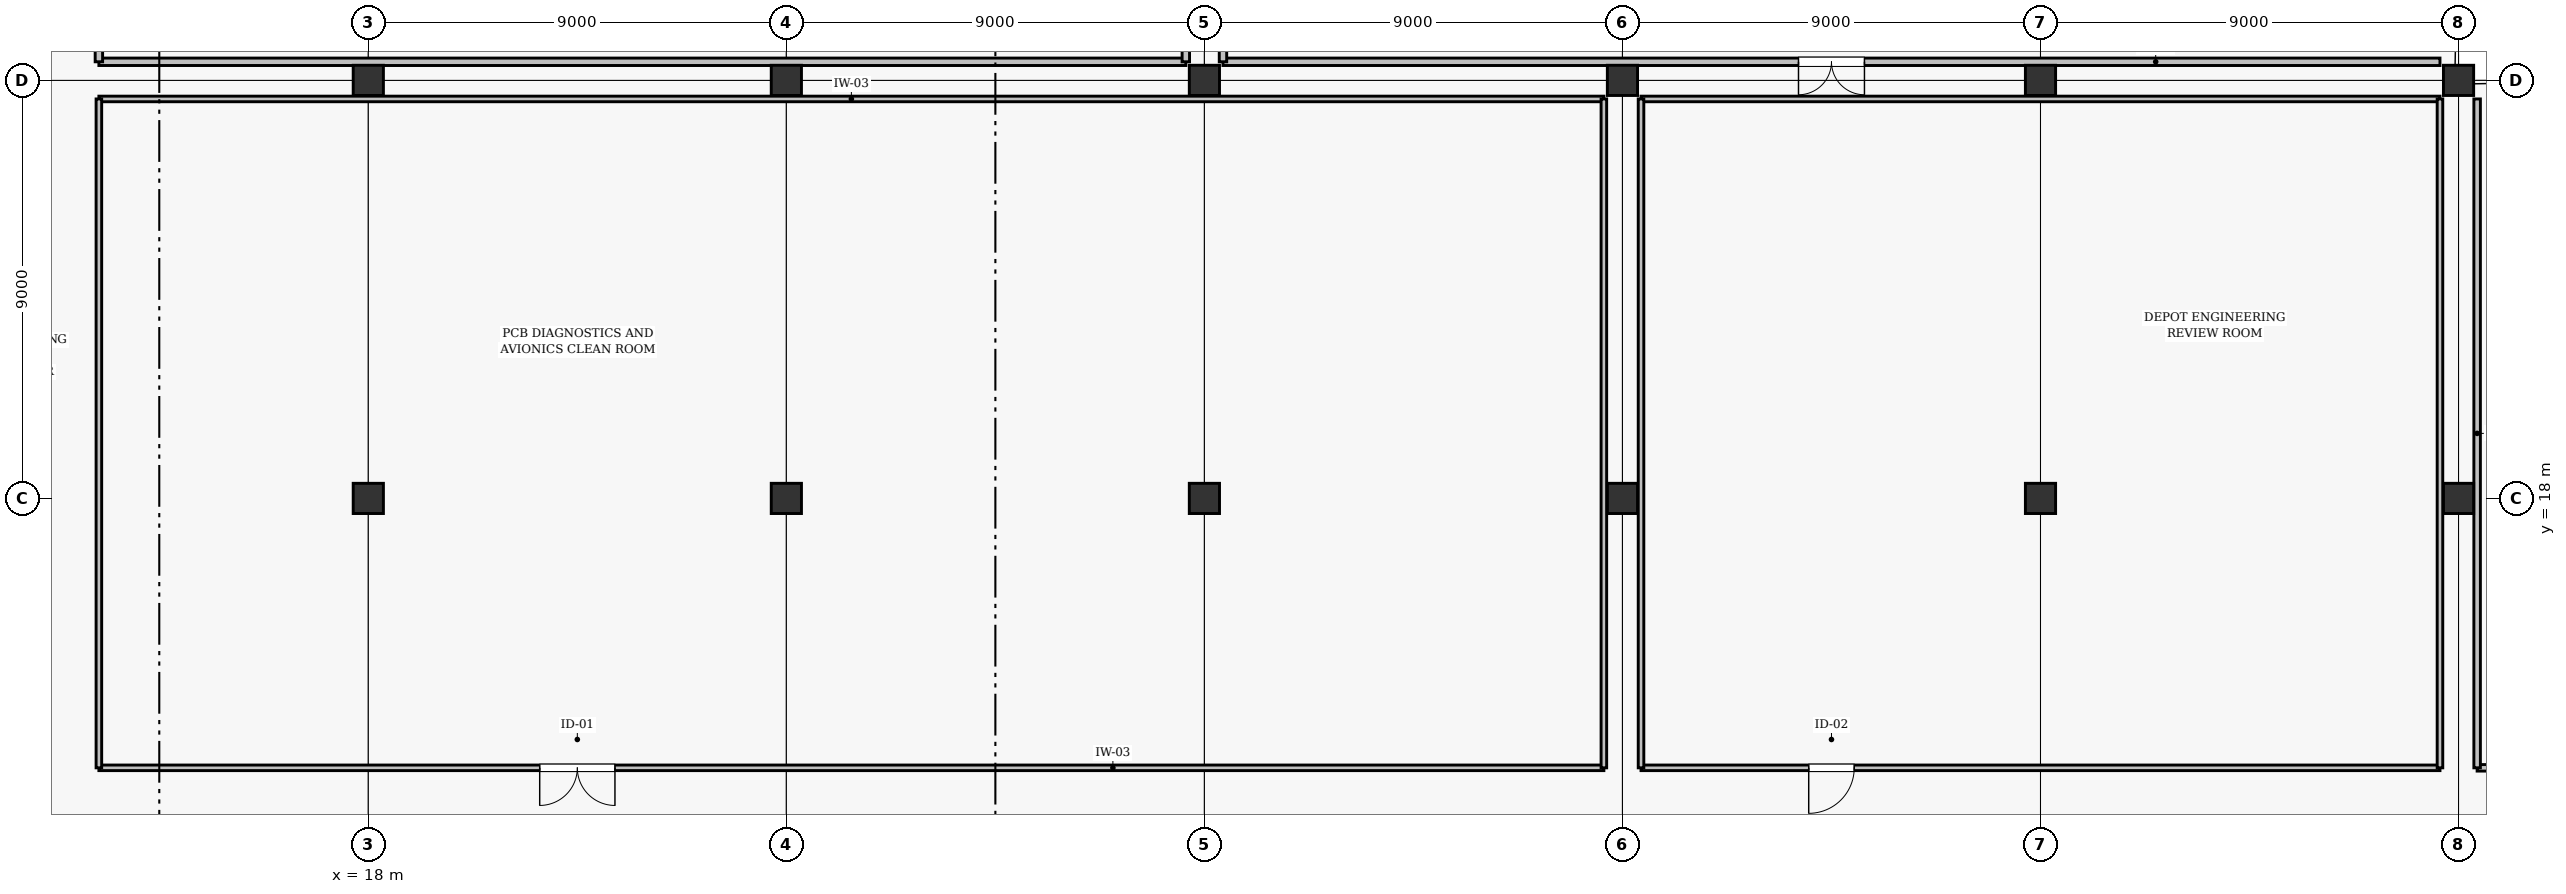
"""IFC4 building model, lengths in metres.
Left out: names, types, materials, properties, quantities, classifications, styles, units other than length and angle.
Written with IfcOpenShell. Run it as: python <this file> out.ifc"""

import sys

from ifc_helpers import new_model, si_unit, direction, frame, frame_2d, origin, origin_2d, place, context, subcontext, project, spatial, rectangle, extrude, element, fill, save


model = new_model("IFC4")
c1 = context("Model", 3, precision=1e-05, world=origin(), true_north=direction((0.0, 1.0)))
c2 = subcontext(c1, "Body", "Model", "MODEL_VIEW")
j1 = project(units=[si_unit("LENGTHUNIT", "METRE"), si_unit("PLANEANGLEUNIT", "RADIAN")], contexts=[c1])
p1 = place(None, origin())
s1 = spatial("IfcSite", under=j1, at=p1, CompositionType="ELEMENT")
p2 = place(p1, origin())
s2 = spatial("IfcBuilding", under=s1, at=p2, CompositionType="ELEMENT")
p3 = place(p2, frame((0.0, 0.0, 4.8)))
s3 = spatial("IfcBuildingStorey", under=s2, at=p3, CompositionType="ELEMENT", Elevation=4.8)
for number, where, z_axis, x_axis in (
    (1, (18.0, 18.0, 0.0), (0.0, 0.0, 1.0), (1.0, 0.0, 0.0)),
    (2, (18.0, 27.0, 0.0), (0.0, 0.0, 1.0), (1.0, 0.0, 0.0)),
    (3, (27.0, 18.0, 0.0), (0.0, 0.0, 1.0), (1.0, 0.0, 0.0)),
    (4, (27.0, 27.0, 0.0), (0.0, 0.0, 1.0), (1.0, 0.0, 0.0)),
    (5, (36.0, 18.0, 0.0), (0.0, 0.0, 1.0), (1.0, 0.0, 0.0)),
    (6, (36.0, 27.0, 0.0), (0.0, 0.0, 1.0), (1.0, 0.0, 0.0)),
    (7, (45.0, 18.0, 0.0), (0.0, 0.0, 1.0), (1.0, 0.0, 0.0)),
    (8, (45.0, 27.0, 0.0), (0.0, 0.0, 1.0), (1.0, 0.0, 0.0)),
    (9, (54.0, 18.0, 0.0), (0.0, 0.0, 1.0), (1.0, 0.0, 0.0)),
    (10, (54.0, 27.0, 0.0), (0.0, 0.0, 1.0), (1.0, 0.0, 0.0)),
    (11, (63.0, 18.0, 0.0), (0.0, 0.0, 1.0), (1.0, 0.0, 0.0)),
    (12, (63.0, 27.0, 0.0), (0.0, 0.0, 1.0), (1.0, 0.0, 0.0)),
):
    element("IfcColumn", number, at=place(p3, frame(where, z_axis=z_axis, x_axis=x_axis)), inside=s3, PredefinedType="COLUMN", context=c2, shape_type="SweptSolid", body=[
        extrude(rectangle(XDim=0.65, YDim=0.65, at=origin_2d()), origin(), (0.0, 0.0, 1.0), 3.6),
    ])
p4 = place(p3, frame((12.2, 12.2, 0.0), z_axis=(0.0, 0.0, 1.0), x_axis=(1.0, 0.0, 0.0)))
e13 = element("IfcWall", 13, at=p4, inside=s3, PredefinedType="PARTITIONING", context=c2, shape_type="SweptSolid", body=[
    extrude(rectangle(XDim=32.4, YDim=0.12, at=frame_2d((16.2, 0.0))), origin(), (0.0, 0.0, 1.0), 2.695),
])
p5 = place(p4, frame((9.49, 0.0, 0.0)))
e14 = element("IfcOpeningElement", 14, at=p5, cuts=e13, PredefinedType="OPENING", context=c2, shape_type="SweptSolid", body=[
    extrude(rectangle(XDim=1.62, YDim=2.14, at=frame_2d((0.81, 1.07))), frame((0.0, 0.07, 0.0), z_axis=(0.0, -1.0, 0.0), x_axis=(1.0, 0.0, 0.0)), (0.0, 0.0, 1.0), 0.14),
])
p6 = place(p3, frame((12.2, 26.6, 0.0), z_axis=(0.0, 0.0, 1.0), x_axis=(1.0, 0.0, 0.0)))
e15 = element("IfcWall", 15, at=p6, inside=s3, PredefinedType="PARTITIONING", context=c2, shape_type="SweptSolid", body=[
    extrude(rectangle(XDim=32.4, YDim=0.12, at=frame_2d((16.2, 0.0))), origin(), (0.0, 0.0, 1.0), 2.695),
])
for number, where, z_axis, x_axis in (
    (16, (12.2, 12.2, 0.0), (0.0, 0.0, 1.0), (0.0, 1.0, 0.0)),
    (17, (44.6, 12.2, 0.0), (0.0, 0.0, 1.0), (0.0, 1.0, 0.0)),
):
    element("IfcWall", number, at=place(p3, frame(where, z_axis=z_axis, x_axis=x_axis)), inside=s3, PredefinedType="PARTITIONING", context=c2, shape_type="SweptSolid", body=[
        extrude(rectangle(XDim=14.4, YDim=0.12, at=frame_2d((7.2, 0.0))), origin(), (0.0, 0.0, 1.0), 2.595),
    ])
p7 = place(p3, frame((45.4, 12.2, 0.0), z_axis=(0.0, 0.0, 1.0), x_axis=(1.0, 0.0, 0.0)))
e18 = element("IfcWall", 18, at=p7, inside=s3, PredefinedType="PARTITIONING", context=c2, shape_type="SweptSolid", body=[
    extrude(rectangle(XDim=17.2, YDim=0.12, at=frame_2d((8.6, 0.0))), origin(), (0.0, 0.0, 1.0), 2.695),
])
p8 = place(p7, frame((3.61, 0.0, 0.0)))
e19 = element("IfcOpeningElement", 19, at=p8, cuts=e18, PredefinedType="OPENING", context=c2, shape_type="SweptSolid", body=[
    extrude(rectangle(XDim=0.98, YDim=2.08, at=frame_2d((0.49, 1.04))), frame((0.0, 0.07, 0.0), z_axis=(0.0, -1.0, 0.0), x_axis=(1.0, 0.0, 0.0)), (0.0, 0.0, 1.0), 0.14),
])
p9 = place(p3, frame((45.4, 26.6, 0.0), z_axis=(0.0, 0.0, 1.0), x_axis=(1.0, 0.0, 0.0)))
e20 = element("IfcWall", 20, at=p9, inside=s3, PredefinedType="PARTITIONING", context=c2, shape_type="SweptSolid", body=[
    extrude(rectangle(XDim=17.2, YDim=0.12, at=frame_2d((8.6, 0.0))), origin(), (0.0, 0.0, 1.0), 2.695),
])
for number, where, z_axis, x_axis in (
    (21, (45.4, 12.2, 0.0), (0.0, 0.0, 1.0), (0.0, 1.0, 0.0)),
    (22, (62.6, 12.2, 0.0), (0.0, 0.0, 1.0), (0.0, 1.0, 0.0)),
):
    element("IfcWall", number, at=place(p3, frame(where, z_axis=z_axis, x_axis=x_axis)), inside=s3, PredefinedType="PARTITIONING", context=c2, shape_type="SweptSolid", body=[
        extrude(rectangle(XDim=14.4, YDim=0.12, at=frame_2d((7.2, 0.0))), origin(), (0.0, 0.0, 1.0), 2.595),
    ])
p10 = place(p3, frame((63.4, 12.2, 0.0), z_axis=(0.0, 0.0, 1.0), x_axis=(1.0, 0.0, 0.0)))
e23 = element("IfcWall", 23, at=p10, inside=s3, PredefinedType="PARTITIONING", context=c2, shape_type="SweptSolid", body=[
    extrude(rectangle(XDim=11.2, YDim=0.14, at=frame_2d((5.6, 0.0))), origin(), (0.0, 0.0, 1.0), 2.695),
])
p11 = place(p10, frame((3.645, 0.0, 0.0)))
e24 = element("IfcOpeningElement", 24, at=p11, cuts=e23, PredefinedType="OPENING", context=c2, shape_type="SweptSolid", body=[
    extrude(rectangle(XDim=0.91, YDim=2.04, at=frame_2d((0.455, 1.02))), frame((0.0, 0.08, 0.0), z_axis=(0.0, -1.0, 0.0), x_axis=(1.0, 0.0, 0.0)), (0.0, 0.0, 1.0), 0.16),
])
p12 = place(p3, frame((63.4, 12.2, 0.0), z_axis=(0.0, 0.0, 1.0), x_axis=(0.0, 1.0, 0.0)))
e25 = element("IfcWall", 25, at=p12, inside=s3, PredefinedType="PARTITIONING", context=c2, shape_type="SweptSolid", body=[
    extrude(rectangle(XDim=14.4, YDim=0.14, at=frame_2d((7.2, 0.0))), origin(), (0.0, 0.0, 1.0), 2.595),
])
p13 = place(p3, frame((12.2, 27.4, 0.0), z_axis=(0.0, 0.0, 1.0), x_axis=(1.0, 0.0, 0.0)))
e26 = element("IfcWall", 26, at=p13, inside=s3, PredefinedType="PARTITIONING", context=c2, shape_type="SweptSolid", body=[
    extrude(rectangle(XDim=23.4, YDim=0.16, at=frame_2d((11.7, 0.0))), origin(), (0.0, 0.0, 1.0), 2.695),
])
p14 = place(p3, frame((12.2, 27.4, 0.0), z_axis=(0.0, 0.0, 1.0), x_axis=(0.0, 1.0, 0.0)))
e27 = element("IfcWall", 27, at=p14, inside=s3, PredefinedType="PARTITIONING", context=c2, shape_type="SweptSolid", body=[
    extrude(rectangle(XDim=17.2, YDim=0.16, at=frame_2d((8.6, 0.0))), origin(), (0.0, 0.0, 1.0), 2.645),
])
p15 = place(p14, frame((3.34, 0.0, 0.0)))
e28 = element("IfcOpeningElement", 28, at=p15, cuts=e27, PredefinedType="OPENING", context=c2, shape_type="SweptSolid", body=[
    extrude(rectangle(XDim=1.52, YDim=2.16, at=frame_2d((0.76, 1.08))), frame((0.0, 0.09, 0.0), z_axis=(0.0, -1.0, 0.0), x_axis=(1.0, 0.0, 0.0)), (0.0, 0.0, 1.0), 0.18),
])
p16 = place(p3, frame((35.6, 27.4, 0.0), z_axis=(0.0, 0.0, 1.0), x_axis=(0.0, 1.0, 0.0)))
e29 = element("IfcWall", 29, at=p16, inside=s3, PredefinedType="PARTITIONING", context=c2, shape_type="SweptSolid", body=[
    extrude(rectangle(XDim=17.2, YDim=0.16, at=frame_2d((8.6, 0.0))), origin(), (0.0, 0.0, 1.0), 2.645),
])
p17 = place(p3, frame((36.4, 27.4, 0.0), z_axis=(0.0, 0.0, 1.0), x_axis=(1.0, 0.0, 0.0)))
e30 = element("IfcWall", 30, at=p17, inside=s3, PredefinedType="PARTITIONING", context=c2, shape_type="SweptSolid", body=[
    extrude(rectangle(XDim=26.2, YDim=0.16, at=frame_2d((13.1, 0.0))), origin(), (0.0, 0.0, 1.0), 2.695),
])
p18 = place(p17, frame((12.39, 0.0, 0.0)))
e31 = element("IfcOpeningElement", 31, at=p18, cuts=e30, PredefinedType="OPENING", context=c2, shape_type="SweptSolid", body=[
    extrude(rectangle(XDim=1.42, YDim=2.12, at=frame_2d((0.71, 1.06))), frame((0.0, 0.09, 0.0), z_axis=(0.0, -1.0, 0.0), x_axis=(1.0, 0.0, 0.0)), (0.0, 0.0, 1.0), 0.18),
])
p19 = place(p3, frame((36.4, 27.4, 0.0), z_axis=(0.0, 0.0, 1.0), x_axis=(0.0, 1.0, 0.0)))
e32 = element("IfcWall", 32, at=p19, inside=s3, PredefinedType="PARTITIONING", context=c2, shape_type="SweptSolid", body=[
    extrude(rectangle(XDim=17.2, YDim=0.16, at=frame_2d((8.6, 0.0))), origin(), (0.0, 0.0, 1.0), 2.645),
])
p20 = place(p5, frame((1.62, 0.0, 0.0), z_axis=(0.0, 0.0, 1.0), x_axis=(-1.0, 0.0, 0.0)))
e33 = element("IfcDoor", 33, at=p20, inside=s3, OperationType="DOUBLE_SWING_LEFT", PredefinedType="DOOR", context=c2, shape_type="SweptSolid", body=[
    extrude(rectangle(XDim=1.62, YDim=2.14, at=frame_2d((0.81, 1.07))), frame((0.0, 0.025, 0.0), z_axis=(0.0, -1.0, 0.0), x_axis=(1.0, 0.0, 0.0)), (0.0, 0.0, 1.0), 0.05),
])
fill(e14, e33)
p21 = place(p8, frame((0.98, 0.0, 0.0), z_axis=(0.0, 0.0, 1.0), x_axis=(-1.0, 0.0, 0.0)))
e34 = element("IfcDoor", 34, at=p21, inside=s3, OperationType="SINGLE_SWING_LEFT", PredefinedType="DOOR", context=c2, shape_type="SweptSolid", body=[
    extrude(rectangle(XDim=0.98, YDim=2.08, at=frame_2d((0.49, 1.04))), frame((0.0, 0.025, 0.0), z_axis=(0.0, -1.0, 0.0), x_axis=(1.0, 0.0, 0.0)), (0.0, 0.0, 1.0), 0.05),
])
fill(e19, e34)
p22 = place(p18, frame((1.42, 0.0, 0.0), z_axis=(0.0, 0.0, 1.0), x_axis=(-1.0, 0.0, 0.0)))
e35 = element("IfcDoor", 35, at=p22, inside=s3, OperationType="DOUBLE_SWING_LEFT", PredefinedType="DOOR", context=c2, shape_type="SweptSolid", body=[
    extrude(rectangle(XDim=1.42, YDim=2.12, at=frame_2d((0.71, 1.06))), frame((0.0, 0.025, 0.0), z_axis=(0.0, -1.0, 0.0), x_axis=(1.0, 0.0, 0.0)), (0.0, 0.0, 1.0), 0.05),
])
fill(e31, e35)
save(model, sys.argv[1])
